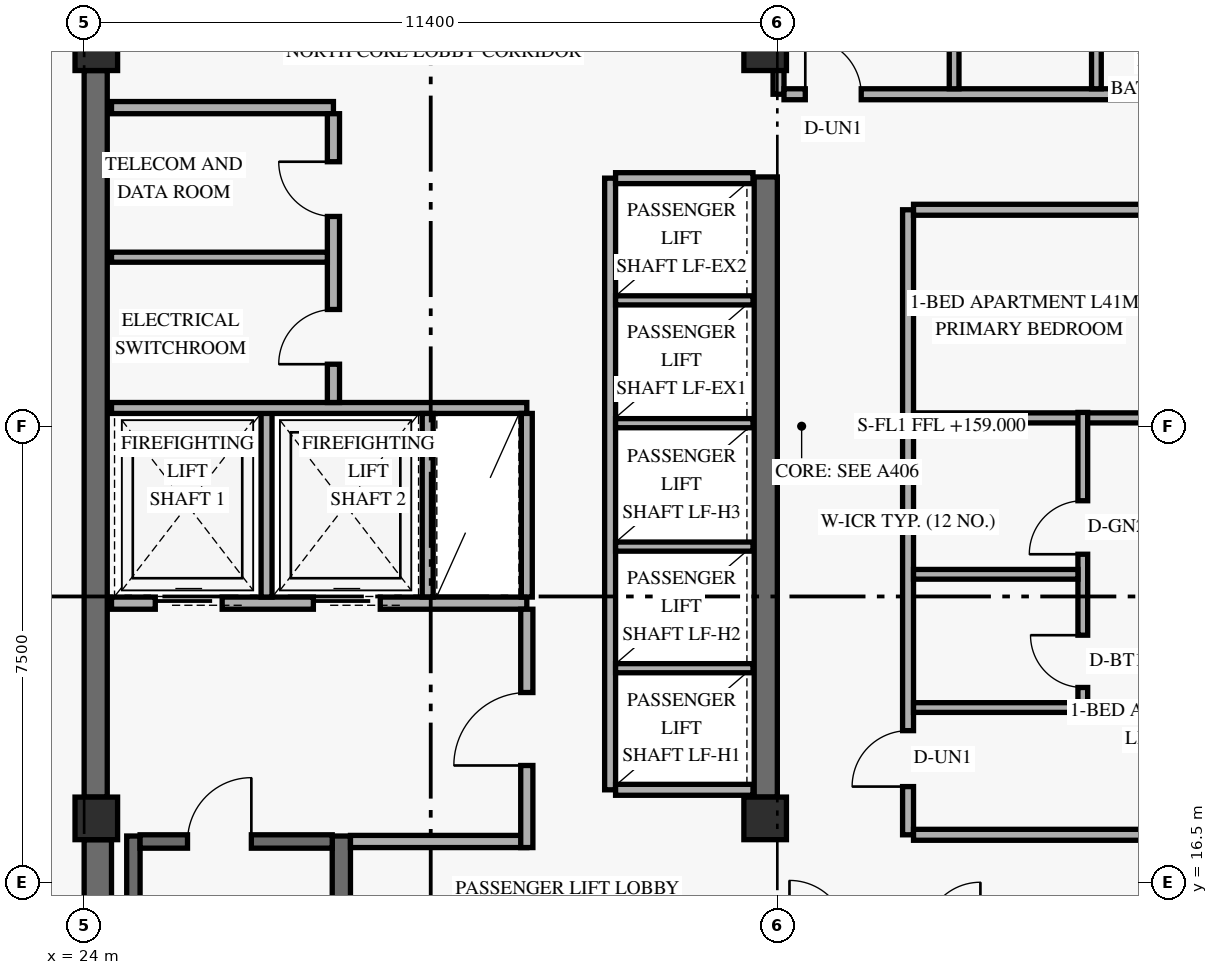
"""IFC4 building model, lengths in metres.
Left out: names, types, materials, properties, quantities, classifications, styles, units other than length and angle.
Written with IfcOpenShell. Run it as: python <this file> out.ifc"""

import sys

from ifc_helpers import new_model, si_unit, direction, frame, frame_2d, origin, origin_2d, place, context, subcontext, project, spatial, rectangle, extrude, element, fill, save


model = new_model("IFC4")
c1 = context("Model", 3, precision=1e-05, world=origin(), true_north=direction((0.0, 1.0)))
c2 = subcontext(c1, "Body", "Model", "MODEL_VIEW")
j1 = project(units=[si_unit("LENGTHUNIT", "METRE"), si_unit("PLANEANGLEUNIT", "RADIAN")], contexts=[c1])
p1 = place(None, origin())
s1 = spatial("IfcSite", under=j1, at=p1, CompositionType="ELEMENT")
p2 = place(p1, origin())
s2 = spatial("IfcBuilding", under=s1, at=p2, CompositionType="ELEMENT")
p3 = place(p2, frame((0.0, 0.0, 159.0)))
s3 = spatial("IfcBuildingStorey", under=s2, at=p3, CompositionType="ELEMENT", Elevation=159.0)
p4 = place(p3, frame((24.225, 9.6, 0.0), z_axis=(0.0, 0.0, 1.0), x_axis=(0.0, 1.0, 0.0)))
e1 = element("IfcWall", 1, at=p4, inside=s3, PredefinedType="SHEAR", context=c2, shape_type="SweptSolid", body=[
    extrude(rectangle(XDim=7.6, YDim=0.45, at=frame_2d((3.8, 0.0))), origin(), (0.0, 0.0, 1.0), 2.748),
])
p5 = place(p3, frame((24.19, 17.9, 0.0), z_axis=(0.0, 0.0, 1.0), x_axis=(0.0, 1.0, 0.0)))
e2 = element("IfcWall", 2, at=p5, inside=s3, PredefinedType="SHEAR", context=c2, shape_type="SweptSolid", body=[
    extrude(rectangle(XDim=11.95, YDim=0.38, at=frame_2d((5.975, 0.0))), origin(), (0.0, 0.0, 1.0), 2.748),
])
p6 = place(p3, frame((35.21, 17.9, 0.0), z_axis=(0.0, 0.0, 1.0), x_axis=(0.0, 1.0, 0.0)))
e3 = element("IfcWall", 3, at=p6, inside=s3, PredefinedType="SHEAR", context=c2, shape_type="SweptSolid", body=[
    extrude(rectangle(XDim=10.2, YDim=0.38, at=frame_2d((5.1, 0.0))), origin(), (0.0, 0.0, 1.0), 2.748),
])
p7 = place(p3, frame((24.81, 9.5, 0.0), z_axis=(0.0, 0.0, 1.0), x_axis=(0.0, 1.0, 0.0)))
e4 = element("IfcWall", 4, at=p7, inside=s3, PredefinedType="SHEAR", context=c2, shape_type="SweptSolid", body=[
    extrude(rectangle(XDim=7.76, YDim=0.22, at=frame_2d((3.88, 0.0))), origin(), (0.0, 0.0, 1.0), 3.36),
])
p8 = place(p3, frame((28.23, 9.5, 0.0), z_axis=(0.0, 0.0, 1.0), x_axis=(0.0, 1.0, 0.0)))
e5 = element("IfcWall", 5, at=p8, inside=s3, PredefinedType="SHEAR", context=c2, shape_type="SweptSolid", body=[
    extrude(rectangle(XDim=7.76, YDim=0.3, at=frame_2d((3.88, 0.0))), origin(), (0.0, 0.0, 1.0), 3.36),
])
p9 = place(p3, frame((24.92, 17.17, 0.0), z_axis=(0.0, 0.0, 1.0), x_axis=(1.0, 0.0, 0.0)))
e6 = element("IfcWall", 6, at=p9, inside=s3, PredefinedType="SHEAR", context=c2, shape_type="SweptSolid", body=[
    extrude(rectangle(XDim=3.16, YDim=0.22, at=frame_2d((1.58, 0.0))), origin(), (0.0, 0.0, 1.0), 3.36),
])
p10 = place(p9, frame((0.78, 0.0, 0.0)))
e7 = element("IfcOpeningElement", 7, at=p10, cuts=e6, PredefinedType="OPENING", context=c2, shape_type="SweptSolid", body=[
    extrude(rectangle(XDim=1.05, YDim=2.15, at=frame_2d((0.525, 1.075))), frame((0.0, 0.12, 0.0), z_axis=(0.0, -1.0, 0.0), x_axis=(1.0, 0.0, 0.0)), (0.0, 0.0, 1.0), 0.24),
])
for number, where, z_axis, x_axis in (
    (8, (24.2, 17.55, 0.0), (0.0, 0.0, 1.0), (1.0, 0.0, 0.0)),
    (9, (24.2, 30.2, 0.0), (0.0, 0.0, 1.0), (1.0, 0.0, 0.0)),
    (10, (35.2, 17.55, 0.0), (0.0, 0.0, 1.0), (1.0, 0.0, 0.0)),
    (11, (35.2, 30.2, 0.0), (0.0, 0.0, 1.0), (1.0, 0.0, 0.0)),
):
    element("IfcColumn", number, at=place(p3, frame(where, z_axis=z_axis, x_axis=x_axis)), inside=s3, PredefinedType="COLUMN", context=c2, shape_type="SweptSolid", body=[
        extrude(rectangle(XDim=0.7, YDim=0.7, at=origin_2d()), origin(), (0.0, 0.0, 1.0), 3.6),
    ])
p11 = place(p3, frame((24.45, 21.09, 0.0), z_axis=(0.0, 0.0, 1.0), x_axis=(1.0, 0.0, 0.0)))
e12 = element("IfcWall", 12, at=p11, inside=s3, PredefinedType="STANDARD", context=c2, shape_type="SweptSolid", body=[
    extrude(rectangle(XDim=6.83, YDim=0.2, at=frame_2d((3.415, 0.0))), origin(), (0.0, 0.0, 1.0), 3.36),
])
p12 = place(p11, frame((0.72, 0.0, 0.0)))
e13 = element("IfcOpeningElement", 13, at=p12, cuts=e12, PredefinedType="OPENING", context=c2, shape_type="SweptSolid", body=[
    extrude(rectangle(XDim=1.1, YDim=2.2, at=frame_2d((0.55, 1.1))), frame((0.0, 0.11, 0.0), z_axis=(0.0, -1.0, 0.0), x_axis=(1.0, 0.0, 0.0)), (0.0, 0.0, 1.0), 0.22),
])
p13 = place(p11, frame((3.32, 0.0, 0.0)))
e14 = element("IfcOpeningElement", 14, at=p13, cuts=e12, PredefinedType="OPENING", context=c2, shape_type="SweptSolid", body=[
    extrude(rectangle(XDim=1.1, YDim=2.2, at=frame_2d((0.55, 1.1))), frame((0.0, 0.11, 0.0), z_axis=(0.0, -1.0, 0.0), x_axis=(1.0, 0.0, 0.0)), (0.0, 0.0, 1.0), 0.22),
])
p14 = place(p3, frame((28.38, 17.17, 0.0), z_axis=(0.0, 0.0, 1.0), x_axis=(1.0, 0.0, 0.0)))
e15 = element("IfcWall", 15, at=p14, inside=s3, PredefinedType="STANDARD", context=c2, shape_type="SweptSolid", body=[
    extrude(rectangle(XDim=2.9, YDim=0.2, at=frame_2d((1.45, 0.0))), origin(), (0.0, 0.0, 1.0), 3.36),
])
p15 = place(p3, frame((31.28, 17.07, 0.0), z_axis=(0.0, 0.0, 1.0), x_axis=(0.0, 1.0, 0.0)))
e16 = element("IfcWall", 16, at=p15, inside=s3, PredefinedType="STANDARD", context=c2, shape_type="SweptSolid", body=[
    extrude(rectangle(XDim=3.92, YDim=0.2, at=frame_2d((1.96, 0.0))), origin(), (0.0, 0.0, 1.0), 2.73),
])
p16 = place(p15, frame((1.35, 0.0, 0.0)))
e17 = element("IfcOpeningElement", 17, at=p16, cuts=e16, PredefinedType="OPENING", context=c2, shape_type="SweptSolid", body=[
    extrude(rectangle(XDim=1.2, YDim=2.15, at=frame_2d((0.6, 1.075))), frame((0.0, 0.11, 0.0), z_axis=(0.0, -1.0, 0.0), x_axis=(1.0, 0.0, 0.0)), (0.0, 0.0, 1.0), 0.22),
])
p17 = place(p3, frame((27.0, 21.19, 0.0), z_axis=(0.0, 0.0, 1.0), x_axis=(0.0, 1.0, 0.0)))
e18 = element("IfcWall", 18, at=p17, inside=s3, PredefinedType="STANDARD", context=c2, shape_type="SweptSolid", body=[
    extrude(rectangle(XDim=3.11, YDim=0.18, at=frame_2d((1.555, 0.0))), origin(), (0.0, 0.0, 1.0), 3.36),
])
p18 = place(p3, frame((24.45, 24.3, 0.0), z_axis=(0.0, 0.0, 1.0), x_axis=(1.0, 0.0, 0.0)))
e19 = element("IfcWall", 19, at=p18, inside=s3, PredefinedType="STANDARD", context=c2, shape_type="SweptSolid", body=[
    extrude(rectangle(XDim=6.83, YDim=0.18, at=frame_2d((3.415, 0.0))), origin(), (0.0, 0.0, 1.0), 3.36),
])
for number, where, z_axis, x_axis in (
    (20, (29.65, 21.19, 0.0), (0.0, 0.0, 1.0), (0.0, 1.0, 0.0)),
    (21, (31.28, 21.19, 0.0), (0.0, 0.0, 1.0), (0.0, 1.0, 0.0)),
):
    element("IfcWall", number, at=place(p3, frame(where, z_axis=z_axis, x_axis=x_axis)), inside=s3, PredefinedType="STANDARD", context=c2, shape_type="SweptSolid", body=[
        extrude(rectangle(XDim=3.02, YDim=0.18, at=frame_2d((1.51, 0.0))), origin(), (0.0, 0.0, 1.0), 3.36),
    ])
p19 = place(p3, frame((24.45, 29.24, 0.0), z_axis=(0.0, 0.0, 1.0), x_axis=(1.0, 0.0, 0.0)))
e22 = element("IfcWall", 22, at=p19, inside=s3, PredefinedType="STANDARD", context=c2, shape_type="SweptSolid", body=[
    extrude(rectangle(XDim=3.65, YDim=0.2, at=frame_2d((1.825, 0.0))), origin(), (0.0, 0.0, 1.0), 3.36),
])
p20 = place(p3, frame((28.1, 24.39, 0.0), z_axis=(0.0, 0.0, 1.0), x_axis=(0.0, 1.0, 0.0)))
e23 = element("IfcWall", 23, at=p20, inside=s3, PredefinedType="STANDARD", context=c2, shape_type="SweptSolid", body=[
    extrude(rectangle(XDim=4.75, YDim=0.2, at=frame_2d((2.375, 0.0))), origin(), (0.0, 0.0, 1.0), 3.36),
])
p21 = place(p20, frame((0.63, 0.0, 0.0)))
e24 = element("IfcOpeningElement", 24, at=p21, cuts=e23, PredefinedType="OPENING", context=c2, shape_type="SweptSolid", body=[
    extrude(rectangle(XDim=0.9, YDim=2.1, at=frame_2d((0.45, 1.05))), frame((0.0, 0.11, 0.0), z_axis=(0.0, -1.0, 0.0), x_axis=(1.0, 0.0, 0.0)), (0.0, 0.0, 1.0), 0.22),
])
p22 = place(p20, frame((3.06, 0.0, 0.0)))
e25 = element("IfcOpeningElement", 25, at=p22, cuts=e23, PredefinedType="OPENING", context=c2, shape_type="SweptSolid", body=[
    extrude(rectangle(XDim=0.9, YDim=2.1, at=frame_2d((0.45, 1.05))), frame((0.0, 0.11, 0.0), z_axis=(0.0, -1.0, 0.0), x_axis=(1.0, 0.0, 0.0)), (0.0, 0.0, 1.0), 0.22),
])
p23 = place(p3, frame((24.45, 26.78, 0.0), z_axis=(0.0, 0.0, 1.0), x_axis=(1.0, 0.0, 0.0)))
e26 = element("IfcWall", 26, at=p23, inside=s3, PredefinedType="PARTITIONING", context=c2, shape_type="SweptSolid", body=[
    extrude(rectangle(XDim=3.55, YDim=0.165, at=frame_2d((1.775, 0.0))), origin(), (0.0, 0.0, 1.0), 3.36),
])
p24 = place(p3, frame((32.65, 18.02, 0.0), z_axis=(0.0, 0.0, 1.0), x_axis=(0.0, 1.0, 0.0)))
e27 = element("IfcWall", 27, at=p24, inside=s3, PredefinedType="STANDARD", context=c2, shape_type="SweptSolid", body=[
    extrude(rectangle(XDim=10.06, YDim=0.18, at=frame_2d((5.03, 0.0))), origin(), (0.0, 0.0, 1.0), 3.36),
])
for number, where, z_axis, x_axis in (
    (28, (32.74, 18.02, 0.0), (0.0, 0.0, 1.0), (1.0, 0.0, 0.0)),
    (29, (32.74, 28.08, 0.0), (0.0, 0.0, 1.0), (1.0, 0.0, 0.0)),
):
    element("IfcWall", number, at=place(p3, frame(where, z_axis=z_axis, x_axis=x_axis)), inside=s3, PredefinedType="STANDARD", context=c2, shape_type="SweptSolid", body=[
        extrude(rectangle(XDim=2.26, YDim=0.18, at=frame_2d((1.13, 0.0))), origin(), (0.0, 0.0, 1.0), 3.36),
    ])
for number, where, z_axis, x_axis in (
    (30, (32.74, 20.02, 0.0), (0.0, 0.0, 1.0), (1.0, 0.0, 0.0)),
    (31, (32.74, 22.02, 0.0), (0.0, 0.0, 1.0), (1.0, 0.0, 0.0)),
    (32, (32.74, 24.05, 0.0), (0.0, 0.0, 1.0), (1.0, 0.0, 0.0)),
    (33, (32.74, 26.07, 0.0), (0.0, 0.0, 1.0), (1.0, 0.0, 0.0)),
):
    element("IfcWall", number, at=place(p3, frame(where, z_axis=z_axis, x_axis=x_axis)), inside=s3, PredefinedType="STANDARD", context=c2, shape_type="SweptSolid", body=[
        extrude(rectangle(XDim=2.26, YDim=0.15, at=frame_2d((1.13, 0.0))), origin(), (0.0, 0.0, 1.0), 3.36),
    ])
p25 = place(p3, frame((37.55, 17.28, 0.0), z_axis=(0.0, 0.0, 1.0), x_axis=(0.0, 1.0, 0.0)))
e34 = element("IfcWall", 34, at=p25, inside=s3, PredefinedType="STANDARD", context=c2, shape_type="SweptSolid", body=[
    extrude(rectangle(XDim=10.28, YDim=0.18, at=frame_2d((5.14, 0.0))), origin(), (0.0, 0.0, 1.0), 2.73),
])
p26 = place(p25, frame((0.793, 0.0, 0.0)))
e35 = element("IfcOpeningElement", 35, at=p26, cuts=e34, PredefinedType="OPENING", context=c2, shape_type="SweptSolid", body=[
    extrude(rectangle(XDim=0.92, YDim=2.15, at=frame_2d((0.46, 1.075))), frame((0.0, 0.1, 0.0), z_axis=(0.0, -1.0, 0.0), x_axis=(1.0, 0.0, 0.0)), (0.0, 0.0, 1.0), 0.2),
])
p27 = place(p3, frame((37.64, 17.28, 0.0), z_axis=(0.0, 0.0, 1.0), x_axis=(1.0, 0.0, 0.0)))
e36 = element("IfcWall", 36, at=p27, inside=s3, PredefinedType="STANDARD", context=c2, shape_type="SweptSolid", body=[
    extrude(rectangle(XDim=12.16, YDim=0.18, at=frame_2d((6.08, 0.0))), origin(), (0.0, 0.0, 1.0), 2.73),
])
p28 = place(p27, frame((6.335, 0.0, 0.0)))
e37 = element("IfcOpeningElement", 37, at=p28, cuts=e36, PredefinedType="OPENING", context=c2, shape_type="SweptSolid", body=[
    extrude(rectangle(XDim=0.92, YDim=2.15, at=frame_2d((0.46, 1.075))), frame((0.0, 0.1, 0.0), z_axis=(0.0, -1.0, 0.0), x_axis=(1.0, 0.0, 0.0)), (0.0, 0.0, 1.0), 0.2),
])
p29 = place(p3, frame((37.64, 27.56, 0.0), z_axis=(0.0, 0.0, 1.0), x_axis=(1.0, 0.0, 0.0)))
e38 = element("IfcWall", 38, at=p29, inside=s3, PredefinedType="STANDARD", context=c2, shape_type="SweptSolid", body=[
    extrude(rectangle(XDim=12.16, YDim=0.18, at=frame_2d((6.08, 0.0))), origin(), (0.0, 0.0, 1.0), 2.73),
])
p30 = place(p3, frame((35.42, 29.46, 0.0), z_axis=(0.0, 0.0, 1.0), x_axis=(0.0, 1.0, 0.0)))
e39 = element("IfcWall", 39, at=p30, inside=s3, PredefinedType="STANDARD", context=c2, shape_type="SweptSolid", body=[
    extrude(rectangle(XDim=1.89, YDim=0.18, at=frame_2d((0.945, 0.0))), origin(), (0.0, 0.0, 1.0), 2.73),
])
p31 = place(p3, frame((35.51, 29.46, 0.0), z_axis=(0.0, 0.0, 1.0), x_axis=(1.0, 0.0, 0.0)))
e40 = element("IfcWall", 40, at=p31, inside=s3, PredefinedType="STANDARD", context=c2, shape_type="SweptSolid", body=[
    extrude(rectangle(XDim=14.29, YDim=0.18, at=frame_2d((7.145, 0.0))), origin(), (0.0, 0.0, 1.0), 2.73),
])
p32 = place(p31, frame((0.35, 0.0, 0.0)))
e41 = element("IfcOpeningElement", 41, at=p32, cuts=e40, PredefinedType="OPENING", context=c2, shape_type="SweptSolid", body=[
    extrude(rectangle(XDim=0.92, YDim=2.15, at=frame_2d((0.46, 1.075))), frame((0.0, 0.1, 0.0), z_axis=(0.0, -1.0, 0.0), x_axis=(1.0, 0.0, 0.0)), (0.0, 0.0, 1.0), 0.2),
])
p33 = place(p31, frame((7.828, 0.0, 0.0)))
e42 = element("IfcOpeningElement", 42, at=p33, cuts=e40, PredefinedType="OPENING", context=c2, shape_type="SweptSolid", body=[
    extrude(rectangle(XDim=0.92, YDim=2.15, at=frame_2d((0.46, 1.075))), frame((0.0, 0.1, 0.0), z_axis=(0.0, -1.0, 0.0), x_axis=(1.0, 0.0, 0.0)), (0.0, 0.0, 1.0), 0.2),
])
p34 = place(p3, frame((38.308, 29.55, 0.0), z_axis=(0.0, 0.0, 1.0), x_axis=(0.0, 1.0, 0.0)))
e43 = element("IfcWall", 43, at=p34, inside=s3, PredefinedType="PLUMBINGWALL", context=c2, shape_type="SweptSolid", body=[
    extrude(rectangle(XDim=2.43, YDim=0.16, at=frame_2d((1.215, 0.0))), origin(), (0.0, 0.0, 1.0), 2.73),
])
p35 = place(p3, frame((40.648, 29.55, 0.0), z_axis=(0.0, 0.0, 1.0), x_axis=(0.0, 1.0, 0.0)))
e44 = element("IfcWall", 44, at=p35, inside=s3, PredefinedType="PLUMBINGWALL", context=c2, shape_type="SweptSolid", body=[
    extrude(rectangle(XDim=2.27, YDim=0.16, at=frame_2d((1.135, 0.0))), origin(), (0.0, 0.0, 1.0), 2.73),
])
p36 = place(p3, frame((37.64, 24.137, 0.0), z_axis=(0.0, 0.0, 1.0), x_axis=(1.0, 0.0, 0.0)))
e45 = element("IfcWall", 45, at=p36, inside=s3, PredefinedType="PARTITIONING", context=c2, shape_type="SweptSolid", body=[
    extrude(rectangle(XDim=6.425, YDim=0.165, at=frame_2d((3.212, 0.0))), origin(), (0.0, 0.0, 1.0), 3.36),
])
p37 = place(p36, frame((4.004, 0.0, 0.0)))
e46 = element("IfcOpeningElement", 46, at=p37, cuts=e45, PredefinedType="OPENING", context=c2, shape_type="SweptSolid", body=[
    extrude(rectangle(XDim=0.9, YDim=2.14, at=frame_2d((0.45, 1.07))), frame((0.0, 0.093, 0.0), z_axis=(0.0, -1.0, 0.0), x_axis=(1.0, 0.0, 0.0)), (0.0, 0.0, 1.0), 0.185),
])
p38 = place(p3, frame((37.64, 19.373, 0.0), z_axis=(0.0, 0.0, 1.0), x_axis=(1.0, 0.0, 0.0)))
e47 = element("IfcWall", 47, at=p38, inside=s3, PredefinedType="PLUMBINGWALL", context=c2, shape_type="SweptSolid", body=[
    extrude(rectangle(XDim=2.864, YDim=0.16, at=frame_2d((1.432, 0.0))), origin(), (0.0, 0.0, 1.0), 3.36),
])
p39 = place(p3, frame((40.424, 19.283, 0.0), z_axis=(0.0, 0.0, 1.0), x_axis=(0.0, 1.0, 0.0)))
e48 = element("IfcWall", 48, at=p39, inside=s3, PredefinedType="PLUMBINGWALL", context=c2, shape_type="SweptSolid", body=[
    extrude(rectangle(XDim=4.944, YDim=0.16, at=frame_2d((2.472, 0.0))), origin(), (0.0, 0.0, 1.0), 3.36),
])
p40 = place(p39, frame((0.42, 0.0, 0.0)))
e49 = element("IfcOpeningElement", 49, at=p40, cuts=e48, PredefinedType="OPENING", context=c2, shape_type="SweptSolid", body=[
    extrude(rectangle(XDim=0.86, YDim=2.12, at=frame_2d((0.43, 1.06))), frame((0.0, 0.09, 0.0), z_axis=(0.0, -1.0, 0.0), x_axis=(1.0, 0.0, 0.0)), (0.0, 0.0, 1.0), 0.18),
])
p41 = place(p39, frame((2.611, 0.0, 0.0)))
e50 = element("IfcOpeningElement", 50, at=p41, cuts=e48, PredefinedType="OPENING", context=c2, shape_type="SweptSolid", body=[
    extrude(rectangle(XDim=0.88, YDim=2.12, at=frame_2d((0.44, 1.06))), frame((0.0, 0.09, 0.0), z_axis=(0.0, -1.0, 0.0), x_axis=(1.0, 0.0, 0.0)), (0.0, 0.0, 1.0), 0.18),
])
p42 = place(p3, frame((37.64, 21.564, 0.0), z_axis=(0.0, 0.0, 1.0), x_axis=(1.0, 0.0, 0.0)))
e51 = element("IfcWall", 51, at=p42, inside=s3, PredefinedType="PLUMBINGWALL", context=c2, shape_type="SweptSolid", body=[
    extrude(rectangle(XDim=2.704, YDim=0.16, at=frame_2d((1.352, 0.0))), origin(), (0.0, 0.0, 1.0), 3.36),
])
p43 = place(p10, frame((1.05, 0.0, 0.0), z_axis=(0.0, 0.0, 1.0), x_axis=(-1.0, 0.0, 0.0)))
e52 = element("IfcDoor", 52, at=p43, inside=s3, OperationType="SINGLE_SWING_LEFT", PredefinedType="DOOR", context=c2, shape_type="SweptSolid", body=[
    extrude(rectangle(XDim=1.05, YDim=2.15, at=frame_2d((0.525, 1.075))), frame((0.0, 0.025, 0.0), z_axis=(0.0, -1.0, 0.0), x_axis=(1.0, 0.0, 0.0)), (0.0, 0.0, 1.0), 0.05),
])
fill(e7, e52)
p44 = place(p12, origin())
e53 = element("IfcDoor", 53, at=p44, inside=s3, OperationType="SLIDING_TO_LEFT", PredefinedType="DOOR", context=c2, shape_type="SweptSolid", body=[
    extrude(rectangle(XDim=1.1, YDim=2.2, at=frame_2d((0.55, 1.1))), frame((0.0, 0.025, 0.0), z_axis=(0.0, -1.0, 0.0), x_axis=(1.0, 0.0, 0.0)), (0.0, 0.0, 1.0), 0.05),
])
fill(e13, e53)
p45 = place(p13, origin())
e54 = element("IfcDoor", 54, at=p45, inside=s3, OperationType="SLIDING_TO_LEFT", PredefinedType="DOOR", context=c2, shape_type="SweptSolid", body=[
    extrude(rectangle(XDim=1.1, YDim=2.2, at=frame_2d((0.55, 1.1))), frame((0.0, 0.025, 0.0), z_axis=(0.0, -1.0, 0.0), x_axis=(1.0, 0.0, 0.0)), (0.0, 0.0, 1.0), 0.05),
])
fill(e14, e54)
p46 = place(p16, origin())
e55 = element("IfcDoor", 55, at=p46, inside=s3, OperationType="SINGLE_SWING_LEFT", PredefinedType="DOOR", context=c2, shape_type="SweptSolid", body=[
    extrude(rectangle(XDim=1.2, YDim=2.15, at=frame_2d((0.6, 1.075))), frame((0.0, 0.025, 0.0), z_axis=(0.0, -1.0, 0.0), x_axis=(1.0, 0.0, 0.0)), (0.0, 0.0, 1.0), 0.05),
])
fill(e17, e55)
p47 = place(p21, origin())
e56 = element("IfcDoor", 56, at=p47, inside=s3, OperationType="SINGLE_SWING_LEFT", PredefinedType="DOOR", context=c2, shape_type="SweptSolid", body=[
    extrude(rectangle(XDim=0.9, YDim=2.1, at=frame_2d((0.45, 1.05))), frame((0.0, 0.025, 0.0), z_axis=(0.0, -1.0, 0.0), x_axis=(1.0, 0.0, 0.0)), (0.0, 0.0, 1.0), 0.05),
])
fill(e24, e56)
p48 = place(p22, origin())
e57 = element("IfcDoor", 57, at=p48, inside=s3, OperationType="SINGLE_SWING_RIGHT", PredefinedType="DOOR", context=c2, shape_type="SweptSolid", body=[
    extrude(rectangle(XDim=0.9, YDim=2.1, at=frame_2d((0.45, 1.05))), frame((0.0, 0.025, 0.0), z_axis=(0.0, -1.0, 0.0), x_axis=(1.0, 0.0, 0.0)), (0.0, 0.0, 1.0), 0.05),
])
fill(e25, e57)
p49 = place(p32, origin())
e58 = element("IfcDoor", 58, at=p49, inside=s3, OperationType="SINGLE_SWING_LEFT", PredefinedType="DOOR", context=c2, shape_type="SweptSolid", body=[
    extrude(rectangle(XDim=0.92, YDim=2.15, at=frame_2d((0.46, 1.075))), frame((0.0, 0.025, 0.0), z_axis=(0.0, -1.0, 0.0), x_axis=(1.0, 0.0, 0.0)), (0.0, 0.0, 1.0), 0.05),
])
fill(e41, e58)
p50 = place(p26, origin())
e59 = element("IfcDoor", 59, at=p50, inside=s3, OperationType="SINGLE_SWING_LEFT", PredefinedType="DOOR", context=c2, shape_type="SweptSolid", body=[
    extrude(rectangle(XDim=0.92, YDim=2.15, at=frame_2d((0.46, 1.075))), frame((0.0, 0.025, 0.0), z_axis=(0.0, -1.0, 0.0), x_axis=(1.0, 0.0, 0.0)), (0.0, 0.0, 1.0), 0.05),
])
fill(e35, e59)
p51 = place(p40, origin())
e60 = element("IfcDoor", 60, at=p51, inside=s3, OperationType="SINGLE_SWING_RIGHT", PredefinedType="DOOR", context=c2, shape_type="SweptSolid", body=[
    extrude(rectangle(XDim=0.86, YDim=2.12, at=frame_2d((0.43, 1.06))), frame((0.0, 0.025, 0.0), z_axis=(0.0, -1.0, 0.0), x_axis=(1.0, 0.0, 0.0)), (0.0, 0.0, 1.0), 0.05),
])
fill(e49, e60)
p52 = place(p41, origin())
e61 = element("IfcDoor", 61, at=p52, inside=s3, OperationType="SINGLE_SWING_LEFT", PredefinedType="DOOR", context=c2, shape_type="SweptSolid", body=[
    extrude(rectangle(XDim=0.88, YDim=2.12, at=frame_2d((0.44, 1.06))), frame((0.0, 0.025, 0.0), z_axis=(0.0, -1.0, 0.0), x_axis=(1.0, 0.0, 0.0)), (0.0, 0.0, 1.0), 0.05),
])
fill(e50, e61)
save(model, sys.argv[1])
